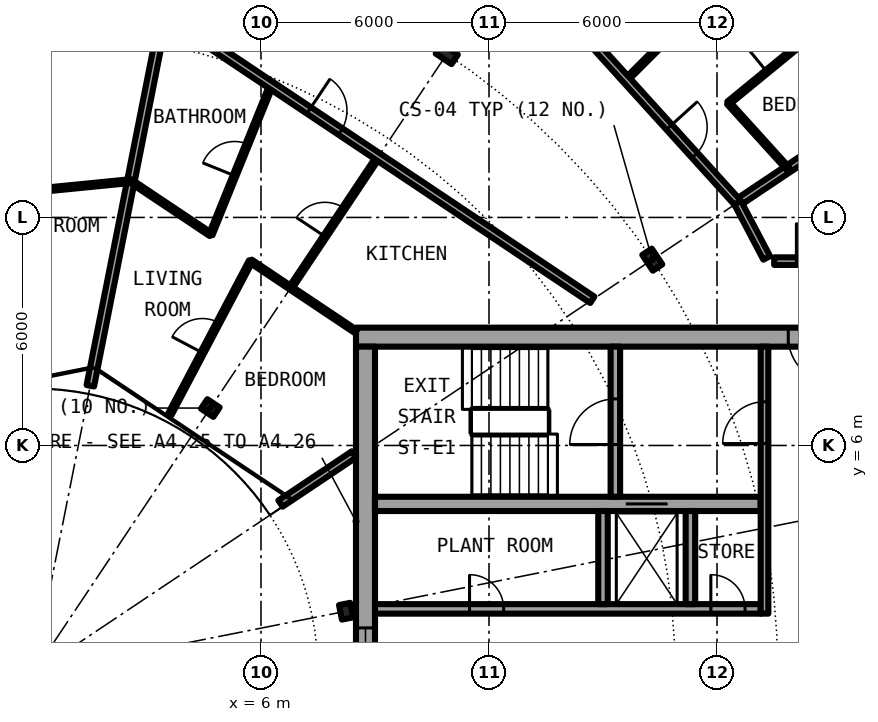
"""IFC4 building model, lengths in metres.
Left out: names, types, materials, properties, quantities, classifications, styles, units other than length and angle.
Written with IfcOpenShell. Run it as: python <this file> out.ifc"""

import sys

from ifc_helpers import new_model, si_unit, direction, frame, frame_2d, origin, origin_2d, place, context, subcontext, project, spatial, rectangle, i_section, extrude, element, fill, save


model = new_model("IFC4")
c1 = context("Model", 3, precision=1e-05, world=origin(), true_north=direction((0.0, 1.0)))
c2 = subcontext(c1, "Body", "Model", "MODEL_VIEW")
j1 = project(units=[si_unit("LENGTHUNIT", "METRE"), si_unit("PLANEANGLEUNIT", "RADIAN")], contexts=[c1])
p1 = place(None, origin())
s1 = spatial("IfcSite", under=j1, at=p1, CompositionType="ELEMENT")
p2 = place(p1, origin())
s2 = spatial("IfcBuilding", under=s1, at=p2, CompositionType="ELEMENT")
p3 = place(p2, frame((0.0, 0.0, 145.2)))
s3 = spatial("IfcBuildingStorey", under=s2, at=p3, CompositionType="ELEMENT", Elevation=145.2)
for number, where, z_axis, x_axis in (
    (1, (16.297, 10.889, 0.0), (0.0, 0.0, 1.0), (0.831, 0.556, 0.0)),
    (2, (10.889, 16.297, 0.0), (0.0, 0.0, 1.0), (0.556, 0.831, 0.0)),
):
    element("IfcColumn", number, at=place(p3, frame(where, z_axis=z_axis, x_axis=x_axis)), inside=s3, PredefinedType="COLUMN", context=c2, shape_type="SweptSolid", body=[
        extrude(i_section(OverallWidth=0.3, OverallDepth=0.5, WebThickness=0.014, FlangeThickness=0.028, FilletRadius=0.027, at=origin_2d()), origin(), (0.0, 0.0, 1.0), 3.05),
    ])
for number, where, z_axis, x_axis in (
    (3, (8.239, 1.639, 0.0), (0.0, 0.0, 1.0), (0.981, 0.195, 0.0)),
    (4, (4.667, 6.984, 0.0), (0.0, 0.0, 1.0), (0.556, 0.831, 0.0)),
):
    element("IfcColumn", number, at=place(p3, frame(where, z_axis=z_axis, x_axis=x_axis)), inside=s3, PredefinedType="COLUMN", context=c2, shape_type="SweptSolid", body=[
        extrude(i_section(OverallWidth=0.3, OverallDepth=0.39, WebThickness=0.011, FlangeThickness=0.019, FilletRadius=0.027, at=origin_2d()), origin(), (0.0, 0.0, 1.0), 3.05),
    ])
p4 = place(p3, frame((22.699, 15.167, 0.0), z_axis=(0.0, 0.0, 1.0), x_axis=(-0.634382322723, 0.773019449054, 0.0)))
e5 = element("IfcWall", 5, at=p4, inside=s3, PredefinedType="SOLIDWALL", context=c2, shape_type="SweptSolid", body=[
    extrude(rectangle(XDim=5.352, YDim=0.25, at=frame_2d((2.676, 0.0))), origin(), (0.0, 0.0, 1.0), 2.7),
])
p5 = place(p4, frame((0.441, 0.0, 0.3)))
e6 = element("IfcOpeningElement", 6, at=p5, cuts=e5, PredefinedType="OPENING", context=c2, shape_type="SweptSolid", body=[
    extrude(rectangle(XDim=1.8, YDim=2.1, at=frame_2d((0.9, 1.05))), frame((0.0, 0.135, 0.0), z_axis=(0.0, -1.0, 0.0), x_axis=(1.0, 0.0, 0.0)), (0.0, 0.0, 1.0), 0.27),
])
p6 = place(p4, frame((3.51, 0.0, 0.0)))
e7 = element("IfcOpeningElement", 7, at=p6, cuts=e5, PredefinedType="OPENING", context=c2, shape_type="SweptSolid", body=[
    extrude(rectangle(XDim=1.0, YDim=2.2, at=frame_2d((0.5, 1.1))), frame((0.0, 0.135, 0.0), z_axis=(0.0, -1.0, 0.0), x_axis=(1.0, 0.0, 0.0)), (0.0, 0.0, 1.0), 0.27),
])
p7 = place(p3, frame((22.1, 8.85, 0.0), z_axis=(0.0, 0.0, 1.0), x_axis=(-1.0, 0.0, 0.0)))
e8 = element("IfcWall", 8, at=p7, inside=s3, PredefinedType="SHEAR", context=c2, shape_type="SweptSolid", body=[
    extrude(rectangle(XDim=13.6, YDim=0.5, at=frame_2d((6.8, 0.0))), origin(), (0.0, 0.0, 1.0), 3.05),
])
p8 = place(p7, frame((1.025, 0.0, 0.0)))
e9 = element("IfcOpeningElement", 9, at=p8, cuts=e8, PredefinedType="OPENING", context=c2, shape_type="SweptSolid", body=[
    extrude(rectangle(XDim=1.2, YDim=2.3, at=frame_2d((0.6, 1.15))), frame((0.0, 0.26, 0.0), z_axis=(0.0, -1.0, 0.0), x_axis=(1.0, 0.0, 0.0)), (0.0, 0.0, 1.0), 0.52),
])
p9 = place(p3, frame((8.75, -8.6, 0.0), z_axis=(0.0, 0.0, 1.0), x_axis=(0.0, 1.0, 0.0)))
e10 = element("IfcWall", 10, at=p9, inside=s3, PredefinedType="SHEAR", context=c2, shape_type="SweptSolid", body=[
    extrude(rectangle(XDim=17.2, YDim=0.5, at=frame_2d((8.6, 0.0))), origin(), (0.0, 0.0, 1.0), 3.05),
])
p10 = place(p9, frame((7.4, 0.0, 0.1)))
e11 = element("IfcOpeningElement", 11, at=p10, cuts=e10, PredefinedType="OPENING", context=c2, shape_type="SweptSolid", body=[
    extrude(rectangle(XDim=2.4, YDim=2.2, at=frame_2d((1.2, 1.1))), frame((0.0, 0.26, 0.0), z_axis=(0.0, -1.0, 0.0), x_axis=(1.0, 0.0, 0.0)), (0.0, 0.0, 1.0), 0.52),
])
p11 = place(p3, frame((9.0, 1.7, 0.0), z_axis=(0.0, 0.0, 1.0), x_axis=(1.0, 0.0, 0.0)))
e12 = element("IfcWall", 12, at=p11, inside=s3, PredefinedType="SHEAR", context=c2, shape_type="SweptSolid", body=[
    extrude(rectangle(XDim=10.15, YDim=0.25, at=frame_2d((5.075, 0.0))), origin(), (0.0, 0.0, 1.0), 3.05),
])
p12 = place(p11, frame((2.488, 0.0, 0.0)))
e13 = element("IfcOpeningElement", 13, at=p12, cuts=e12, PredefinedType="OPENING", context=c2, shape_type="SweptSolid", body=[
    extrude(rectangle(XDim=0.9, YDim=2.3, at=frame_2d((0.45, 1.15))), frame((0.0, 0.135, 0.0), z_axis=(0.0, -1.0, 0.0), x_axis=(1.0, 0.0, 0.0)), (0.0, 0.0, 1.0), 0.27),
])
p13 = place(p11, frame((8.837, 0.0, 0.0)))
e14 = element("IfcOpeningElement", 14, at=p13, cuts=e12, PredefinedType="OPENING", context=c2, shape_type="SweptSolid", body=[
    extrude(rectangle(XDim=0.9, YDim=2.3, at=frame_2d((0.45, 1.15))), frame((0.0, 0.135, 0.0), z_axis=(0.0, -1.0, 0.0), x_axis=(1.0, 0.0, 0.0)), (0.0, 0.0, 1.0), 0.27),
])
p14 = place(p3, frame((9.0, 4.462, 0.0), z_axis=(0.0, 0.0, 1.0), x_axis=(1.0, 0.0, 0.0)))
e15 = element("IfcWall", 15, at=p14, inside=s3, PredefinedType="SHEAR", context=c2, shape_type="SweptSolid", body=[
    extrude(rectangle(XDim=10.15, YDim=0.375, at=frame_2d((5.075, 0.0))), origin(), (0.0, 0.0, 1.0), 3.05),
])
p15 = place(p14, frame((6.6, 0.0, 0.0)))
e16 = element("IfcOpeningElement", 16, at=p15, cuts=e15, PredefinedType="OPENING", context=c2, shape_type="SweptSolid", body=[
    extrude(rectangle(XDim=1.1, YDim=2.3, at=frame_2d((0.55, 1.15))), frame((0.0, 0.198, 0.0), z_axis=(0.0, -1.0, 0.0), x_axis=(1.0, 0.0, 0.0)), (0.0, 0.0, 1.0), 0.395),
])
p16 = place(p3, frame((15.325, 4.65, 0.0), z_axis=(0.0, 0.0, 1.0), x_axis=(0.0, 1.0, 0.0)))
e17 = element("IfcWall", 17, at=p16, inside=s3, PredefinedType="SHEAR", context=c2, shape_type="SweptSolid", body=[
    extrude(rectangle(XDim=3.95, YDim=0.25, at=frame_2d((1.975, 0.0))), origin(), (0.0, 0.0, 1.0), 3.05),
])
p17 = place(p16, frame((1.375, 0.0, 0.0)))
e18 = element("IfcOpeningElement", 18, at=p17, cuts=e17, PredefinedType="OPENING", context=c2, shape_type="SweptSolid", body=[
    extrude(rectangle(XDim=1.2, YDim=2.3, at=frame_2d((0.6, 1.15))), frame((0.0, 0.135, 0.0), z_axis=(0.0, -1.0, 0.0), x_axis=(1.0, 0.0, 0.0)), (0.0, 0.0, 1.0), 0.27),
])
for number, where, z_axis, x_axis in (
    (19, (15.0, 1.825, 0.0), (0.0, 0.0, 1.0), (0.0, 1.0, 0.0)),
    (20, (17.3, 1.825, 0.0), (0.0, 0.0, 1.0), (0.0, 1.0, 0.0)),
):
    element("IfcWall", number, at=place(p3, frame(where, z_axis=z_axis, x_axis=x_axis)), inside=s3, PredefinedType="SOLIDWALL", context=c2, shape_type="SweptSolid", body=[
        extrude(rectangle(XDim=2.45, YDim=0.25, at=frame_2d((1.225, 0.0))), origin(), (0.0, 0.0, 1.0), 2.7),
    ])
p18 = place(p3, frame((19.25, 1.575, 0.0), z_axis=(0.0, 0.0, 1.0), x_axis=(0.0, 1.0, 0.0)))
e21 = element("IfcWall", 21, at=p18, inside=s3, PredefinedType="SOLIDWALL", context=c2, shape_type="SweptSolid", body=[
    extrude(rectangle(XDim=7.025, YDim=0.2, at=frame_2d((3.513, 0.0))), origin(), (0.0, 0.0, 1.0), 2.7),
])
p19 = place(p18, frame((4.475, 0.0, 0.0)))
e22 = element("IfcOpeningElement", 22, at=p19, cuts=e21, PredefinedType="OPENING", context=c2, shape_type="SweptSolid", body=[
    extrude(rectangle(XDim=1.1, YDim=2.3, at=frame_2d((0.55, 1.15))), frame((0.0, 0.11, 0.0), z_axis=(0.0, -1.0, 0.0), x_axis=(1.0, 0.0, 0.0)), (0.0, 0.0, 1.0), 0.22),
])
p20 = place(p3, frame((1.509, 7.571, 0.0), z_axis=(0.0, 0.0, 1.0), x_axis=(0.194375258943, 0.980927244351, 0.0)))
e23 = element("IfcWall", 23, at=p20, inside=s3, PredefinedType="PARTITIONING", context=c2, shape_type="SweptSolid", body=[
    extrude(rectangle(XDim=9.98, YDim=0.2, at=frame_2d((4.99, 0.0))), origin(), (0.0, 0.0, 1.0), 2.7),
])
p21 = place(p3, frame((3.605, 6.827, 0.0), z_axis=(0.0, 0.0, 1.0), x_axis=(0.466962677975, 0.884277025246, 0.0)))
e24 = element("IfcWall", 24, at=p21, inside=s3, PredefinedType="PARTITIONING", context=c2, shape_type="SweptSolid", body=[
    extrude(rectangle(XDim=4.549, YDim=0.1, at=frame_2d((2.274, 0.0))), origin(), (0.0, 0.0, 1.0), 2.7),
])
p22 = place(p21, frame((1.824, 0.0, 0.0)))
e25 = element("IfcOpeningElement", 25, at=p22, cuts=e24, PredefinedType="OPENING", context=c2, shape_type="SweptSolid", body=[
    extrude(rectangle(XDim=0.9, YDim=2.3, at=frame_2d((0.45, 1.15))), frame((0.0, 0.06, 0.0), z_axis=(0.0, -1.0, 0.0), x_axis=(1.0, 0.0, 0.0)), (0.0, 0.0, 1.0), 0.12),
])
p23 = place(p3, frame((4.678, 11.551, 0.0), z_axis=(0.0, 0.0, 1.0), x_axis=(0.375509828455, 0.926818411952, 0.0)))
e26 = element("IfcWall", 26, at=p23, inside=s3, PredefinedType="PARTITIONING", context=c2, shape_type="SweptSolid", body=[
    extrude(rectangle(XDim=4.237, YDim=0.1, at=frame_2d((2.119, 0.0))), origin(), (0.0, 0.0, 1.0), 2.7),
])
p24 = place(p23, frame((1.669, 0.0, 0.0)))
e27 = element("IfcOpeningElement", 27, at=p24, cuts=e26, PredefinedType="OPENING", context=c2, shape_type="SweptSolid", body=[
    extrude(rectangle(XDim=0.9, YDim=2.3, at=frame_2d((0.45, 1.15))), frame((0.0, 0.06, 0.0), z_axis=(0.0, -1.0, 0.0), x_axis=(1.0, 0.0, 0.0)), (0.0, 0.0, 1.0), 0.12),
])
p25 = place(p3, frame((6.78, 10.147, 0.0), z_axis=(0.0, 0.0, 1.0), x_axis=(0.555528237031, 0.831497671591, 0.0)))
e28 = element("IfcWall", 28, at=p25, inside=s3, PredefinedType="PARTITIONING", context=c2, shape_type="SweptSolid", body=[
    extrude(rectangle(XDim=4.149, YDim=0.1, at=frame_2d((2.075, 0.0))), origin(), (0.0, 0.0, 1.0), 2.7),
])
p26 = place(p25, frame((1.625, 0.0, 0.0)))
e29 = element("IfcOpeningElement", 29, at=p26, cuts=e28, PredefinedType="OPENING", context=c2, shape_type="SweptSolid", body=[
    extrude(rectangle(XDim=0.9, YDim=2.3, at=frame_2d((0.45, 1.15))), frame((0.0, 0.06, 0.0), z_axis=(0.0, -1.0, 0.0), x_axis=(1.0, 0.0, 0.0)), (0.0, 0.0, 1.0), 0.12),
])
p27 = place(p3, frame((15.612, 15.622, 0.0), z_axis=(0.0, 0.0, 1.0), x_axis=(0.70679853939, 0.707414888673, 0.0)))
e30 = element("IfcWall", 30, at=p27, inside=s3, PredefinedType="PARTITIONING", context=c2, shape_type="SweptSolid", body=[
    extrude(rectangle(XDim=1.584, YDim=0.1, at=frame_2d((0.792, 0.0))), origin(), (0.0, 0.0, 1.0), 2.7),
])
p28 = place(p3, frame((18.302, 15.01, 0.0), z_axis=(0.0, 0.0, 1.0), x_axis=(0.773165322764, 0.634204528267, 0.0)))
e31 = element("IfcWall", 31, at=p28, inside=s3, PredefinedType="PARTITIONING", context=c2, shape_type="SweptSolid", body=[
    extrude(rectangle(XDim=3.505, YDim=0.1, at=frame_2d((1.752, 0.0))), origin(), (0.0, 0.0, 1.0), 2.7),
])
p29 = place(p28, frame((1.303, 0.0, 0.0)))
e32 = element("IfcOpeningElement", 32, at=p29, cuts=e31, PredefinedType="OPENING", context=c2, shape_type="SweptSolid", body=[
    extrude(rectangle(XDim=0.9, YDim=2.3, at=frame_2d((0.45, 1.15))), frame((0.0, 0.06, 0.0), z_axis=(0.0, -1.0, 0.0), x_axis=(1.0, 0.0, 0.0)), (0.0, 0.0, 1.0), 0.12),
])
p30 = place(p3, frame((18.542, 12.389, 0.0), z_axis=(0.0, 0.0, 1.0), x_axis=(0.831387096605, 0.55569370664, 0.0)))
e33 = element("IfcWall", 33, at=p30, inside=s3, PredefinedType="PARTITIONING", context=c2, shape_type="SweptSolid", body=[
    extrude(rectangle(XDim=4.875, YDim=0.2, at=frame_2d((2.438, 0.0))), origin(), (0.0, 0.0, 1.0), 2.7),
])
p31 = place(p3, frame((6.513, 4.472, 0.0), z_axis=(0.0, 0.0, 1.0), x_axis=(0.83133816625, 0.555766905579, 0.0)))
e34 = element("IfcWall", 34, at=p31, inside=s3, PredefinedType="PARTITIONING", context=c2, shape_type="SweptSolid", body=[
    extrude(rectangle(XDim=2.323, YDim=0.2, at=frame_2d((1.162, 0.0))), origin(), (0.0, 0.0, 1.0), 2.7),
])
p32 = place(p3, frame((19.504, 10.85, 0.0), z_axis=(0.0, 0.0, 1.0), x_axis=(1.0, 0.0, 0.0)))
e35 = element("IfcWall", 35, at=p32, inside=s3, PredefinedType="PARTITIONING", context=c2, shape_type="SweptSolid", body=[
    extrude(rectangle(XDim=2.171, YDim=0.2, at=frame_2d((1.085, 0.0))), origin(), (0.0, 0.0, 1.0), 2.7),
])
p33 = place(p32, frame((0.585, 0.0, 0.0)))
e36 = element("IfcOpeningElement", 36, at=p33, cuts=e35, PredefinedType="OPENING", context=c2, shape_type="SweptSolid", body=[
    extrude(rectangle(XDim=1.0, YDim=2.3, at=frame_2d((0.5, 1.15))), frame((0.0, 0.11, 0.0), z_axis=(0.0, -1.0, 0.0), x_axis=(1.0, 0.0, 0.0)), (0.0, 0.0, 1.0), 0.22),
])
p34 = place(p3, frame((2.577, 12.955, 0.0), z_axis=(0.0, 0.0, 1.0), x_axis=(0.831440395268, -0.555613956912, 0.0)))
e37 = element("IfcWall", 37, at=p34, inside=s3, PredefinedType="PARTITIONING", context=c2, shape_type="SweptSolid", body=[
    extrude(rectangle(XDim=2.527, YDim=0.1, at=frame_2d((1.264, 0.0))), origin(), (0.0, 0.0, 1.0), 2.7),
])
p35 = place(p3, frame((5.731, 10.848, 0.0), z_axis=(0.0, 0.0, 1.0), x_axis=(0.831339441646, -0.555764997786, 0.0)))
e38 = element("IfcWall", 38, at=p35, inside=s3, PredefinedType="PARTITIONING", context=c2, shape_type="SweptSolid", body=[
    extrude(rectangle(XDim=3.332, YDim=0.1, at=frame_2d((1.666, 0.0))), origin(), (0.0, 0.0, 1.0), 2.7),
])
p36 = place(p3, frame((-1.246, 12.578, 0.0), z_axis=(0.0, 0.0, 1.0), x_axis=(0.995125670186, 0.098614910314, 0.0)))
e39 = element("IfcWall", 39, at=p36, inside=s3, PredefinedType="PARTITIONING", context=c2, shape_type="SweptSolid", body=[
    extrude(rectangle(XDim=3.835, YDim=0.1, at=frame_2d((1.917, 0.0))), origin(), (0.0, 0.0, 1.0), 2.7),
])
p37 = place(p3, frame((3.453, 17.36, 0.0), z_axis=(0.0, 0.0, 1.0), x_axis=(0.831437137577, -0.555618831806, 0.0)))
e40 = element("IfcWall", 40, at=p37, inside=s3, PredefinedType="PARTITIONING", context=c2, shape_type="SweptSolid", body=[
    extrude(rectangle(XDim=13.549, YDim=0.2, at=frame_2d((6.774, 0.0))), origin(), (0.0, 0.0, 1.0), 2.7),
])
p38 = place(p37, frame((4.581, 0.0, 0.0)))
e41 = element("IfcOpeningElement", 41, at=p38, cuts=e40, PredefinedType="OPENING", context=c2, shape_type="SweptSolid", body=[
    extrude(rectangle(XDim=1.0, YDim=2.3, at=frame_2d((0.5, 1.15))), frame((0.0, 0.11, 0.0), z_axis=(0.0, -1.0, 0.0), x_axis=(1.0, 0.0, 0.0)), (0.0, 0.0, 1.0), 0.22),
])
p39 = place(p3, frame((-6.773, 16.353, 0.0), z_axis=(0.0, 0.0, 1.0), x_axis=(0.995201809366, 0.097843541607, 0.0)))
e42 = element("IfcWall", 42, at=p39, inside=s3, PredefinedType="PARTITIONING", context=c2, shape_type="SweptSolid", body=[
    extrude(rectangle(XDim=10.28, YDim=0.2, at=frame_2d((5.14, 0.0))), origin(), (0.0, 0.0, 1.0), 2.7),
])
p40 = place(p39, frame((4.638, 0.0, 0.0)))
e43 = element("IfcOpeningElement", 43, at=p40, cuts=e42, PredefinedType="OPENING", context=c2, shape_type="SweptSolid", body=[
    extrude(rectangle(XDim=1.0, YDim=2.3, at=frame_2d((0.5, 1.15))), frame((0.0, 0.11, 0.0), z_axis=(0.0, -1.0, 0.0), x_axis=(1.0, 0.0, 0.0)), (0.0, 0.0, 1.0), 0.22),
])
p41 = place(p3, frame((14.147, 17.238, 0.0), z_axis=(0.0, 0.0, 1.0), x_axis=(0.671561669125, -0.740948665268, 0.0)))
e44 = element("IfcWall", 44, at=p41, inside=s3, PredefinedType="PARTITIONING", context=c2, shape_type="SweptSolid", body=[
    extrude(rectangle(XDim=6.544, YDim=0.2, at=frame_2d((3.272, 0.0))), origin(), (0.0, 0.0, 1.0), 2.7),
])
p42 = place(p41, frame((3.862, 0.0, 0.0)))
e45 = element("IfcOpeningElement", 45, at=p42, cuts=e44, PredefinedType="OPENING", context=c2, shape_type="SweptSolid", body=[
    extrude(rectangle(XDim=1.0, YDim=2.3, at=frame_2d((0.5, 1.15))), frame((0.0, 0.11, 0.0), z_axis=(0.0, -1.0, 0.0), x_axis=(1.0, 0.0, 0.0)), (0.0, 0.0, 1.0), 0.22),
])
p43 = place(p3, frame((18.542, 12.389, 0.0), z_axis=(0.0, 0.0, 1.0), x_axis=(0.465605550524, -0.884992356646, 0.0)))
e46 = element("IfcWall", 46, at=p43, inside=s3, PredefinedType="PARTITIONING", context=c2, shape_type="SweptSolid", body=[
    extrude(rectangle(XDim=1.643, YDim=0.2, at=frame_2d((0.821, 0.0))), origin(), (0.0, 0.0, 1.0), 2.7),
])
p44 = place(p3, frame((18.302, 15.01, 0.0), z_axis=(0.0, 0.0, 1.0), x_axis=(0.671637685376, -0.740879760544, 0.0)))
e47 = element("IfcWall", 47, at=p44, inside=s3, PredefinedType="PARTITIONING", context=c2, shape_type="SweptSolid", body=[
    extrude(rectangle(XDim=2.338, YDim=0.1, at=frame_2d((1.169, 0.0))), origin(), (0.0, 0.0, 1.0), 2.7),
])
p45 = place(p15, origin())
e48 = element("IfcDoor", 48, at=p45, inside=s3, OperationType="DOUBLE_DOOR_SLIDING", PredefinedType="DOOR", context=c2, shape_type="SweptSolid", body=[
    extrude(rectangle(XDim=1.1, YDim=2.3, at=frame_2d((0.55, 1.15))), frame((0.0, 0.025, 0.0), z_axis=(0.0, -1.0, 0.0), x_axis=(1.0, 0.0, 0.0)), (0.0, 0.0, 1.0), 0.05),
])
fill(e16, e48)
p46 = place(p12, origin())
e49 = element("IfcDoor", 49, at=p46, inside=s3, OperationType="SINGLE_SWING_RIGHT", PredefinedType="DOOR", context=c2, shape_type="SweptSolid", body=[
    extrude(rectangle(XDim=0.9, YDim=2.3, at=frame_2d((0.45, 1.15))), frame((0.0, 0.025, 0.0), z_axis=(0.0, -1.0, 0.0), x_axis=(1.0, 0.0, 0.0)), (0.0, 0.0, 1.0), 0.05),
])
fill(e13, e49)
p47 = place(p13, origin())
e50 = element("IfcDoor", 50, at=p47, inside=s3, OperationType="SINGLE_SWING_LEFT", PredefinedType="DOOR", context=c2, shape_type="SweptSolid", body=[
    extrude(rectangle(XDim=0.9, YDim=2.3, at=frame_2d((0.45, 1.15))), frame((0.0, 0.025, 0.0), z_axis=(0.0, -1.0, 0.0), x_axis=(1.0, 0.0, 0.0)), (0.0, 0.0, 1.0), 0.05),
])
fill(e14, e50)
p48 = place(p17, origin())
e51 = element("IfcDoor", 51, at=p48, inside=s3, OperationType="SINGLE_SWING_LEFT", PredefinedType="DOOR", context=c2, shape_type="SweptSolid", body=[
    extrude(rectangle(XDim=1.2, YDim=2.3, at=frame_2d((0.6, 1.15))), frame((0.0, 0.025, 0.0), z_axis=(0.0, -1.0, 0.0), x_axis=(1.0, 0.0, 0.0)), (0.0, 0.0, 1.0), 0.05),
])
fill(e18, e51)
p49 = place(p19, origin())
e52 = element("IfcDoor", 52, at=p49, inside=s3, OperationType="SINGLE_SWING_LEFT", PredefinedType="DOOR", context=c2, shape_type="SweptSolid", body=[
    extrude(rectangle(XDim=1.1, YDim=2.3, at=frame_2d((0.55, 1.15))), frame((0.0, 0.025, 0.0), z_axis=(0.0, -1.0, 0.0), x_axis=(1.0, 0.0, 0.0)), (0.0, 0.0, 1.0), 0.05),
])
fill(e22, e52)
p50 = place(p8, origin())
e53 = element("IfcDoor", 53, at=p50, inside=s3, OperationType="SINGLE_SWING_RIGHT", PredefinedType="DOOR", context=c2, shape_type="SweptSolid", body=[
    extrude(rectangle(XDim=1.2, YDim=2.3, at=frame_2d((0.6, 1.15))), frame((0.0, 0.025, 0.0), z_axis=(0.0, -1.0, 0.0), x_axis=(1.0, 0.0, 0.0)), (0.0, 0.0, 1.0), 0.05),
])
fill(e9, e53)
p51 = place(p10, origin())
e54 = element("IfcWindow", 54, at=p51, inside=s3, PartitioningType="SINGLE_PANEL", PredefinedType="WINDOW", context=c2, shape_type="SweptSolid", body=[
    extrude(rectangle(XDim=2.4, YDim=2.2, at=frame_2d((1.2, 1.1))), frame((0.0, 0.03, 0.0), z_axis=(0.0, -1.0, 0.0), x_axis=(1.0, 0.0, 0.0)), (0.0, 0.0, 1.0), 0.06),
])
fill(e11, e54)
p52 = place(p42, origin())
e55 = element("IfcDoor", 55, at=p52, inside=s3, OperationType="SINGLE_SWING_RIGHT", PredefinedType="DOOR", context=c2, shape_type="SweptSolid", body=[
    extrude(rectangle(XDim=1.0, YDim=2.3, at=frame_2d((0.5, 1.15))), frame((0.0, 0.025, 0.0), z_axis=(0.0, -1.0, 0.0), x_axis=(1.0, 0.0, 0.0)), (0.0, 0.0, 1.0), 0.05),
])
fill(e45, e55)
p53 = place(p29, origin())
e56 = element("IfcDoor", 56, at=p53, inside=s3, OperationType="SINGLE_SWING_RIGHT", PredefinedType="DOOR", context=c2, shape_type="SweptSolid", body=[
    extrude(rectangle(XDim=0.9, YDim=2.3, at=frame_2d((0.45, 1.15))), frame((0.0, 0.025, 0.0), z_axis=(0.0, -1.0, 0.0), x_axis=(1.0, 0.0, 0.0)), (0.0, 0.0, 1.0), 0.05),
])
fill(e32, e56)
p54 = place(p38, origin())
e57 = element("IfcDoor", 57, at=p54, inside=s3, OperationType="SINGLE_SWING_LEFT", PredefinedType="DOOR", context=c2, shape_type="SweptSolid", body=[
    extrude(rectangle(XDim=1.0, YDim=2.3, at=frame_2d((0.5, 1.15))), frame((0.0, 0.025, 0.0), z_axis=(0.0, -1.0, 0.0), x_axis=(1.0, 0.0, 0.0)), (0.0, 0.0, 1.0), 0.05),
])
fill(e41, e57)
p55 = place(p24, origin())
e58 = element("IfcDoor", 58, at=p55, inside=s3, OperationType="SINGLE_SWING_RIGHT", PredefinedType="DOOR", context=c2, shape_type="SweptSolid", body=[
    extrude(rectangle(XDim=0.9, YDim=2.3, at=frame_2d((0.45, 1.15))), frame((0.0, 0.025, 0.0), z_axis=(0.0, -1.0, 0.0), x_axis=(1.0, 0.0, 0.0)), (0.0, 0.0, 1.0), 0.05),
])
fill(e27, e58)
p56 = place(p26, origin())
e59 = element("IfcDoor", 59, at=p56, inside=s3, OperationType="SINGLE_SWING_RIGHT", PredefinedType="DOOR", context=c2, shape_type="SweptSolid", body=[
    extrude(rectangle(XDim=0.9, YDim=2.3, at=frame_2d((0.45, 1.15))), frame((0.0, 0.025, 0.0), z_axis=(0.0, -1.0, 0.0), x_axis=(1.0, 0.0, 0.0)), (0.0, 0.0, 1.0), 0.05),
])
fill(e29, e59)
p57 = place(p22, origin())
e60 = element("IfcDoor", 60, at=p57, inside=s3, OperationType="SINGLE_SWING_LEFT", PredefinedType="DOOR", context=c2, shape_type="SweptSolid", body=[
    extrude(rectangle(XDim=0.9, YDim=2.3, at=frame_2d((0.45, 1.15))), frame((0.0, 0.025, 0.0), z_axis=(0.0, -1.0, 0.0), x_axis=(1.0, 0.0, 0.0)), (0.0, 0.0, 1.0), 0.05),
])
fill(e25, e60)
p58 = place(p33, origin())
e61 = element("IfcDoor", 61, at=p58, inside=s3, OperationType="SINGLE_SWING_LEFT", PredefinedType="DOOR", context=c2, shape_type="SweptSolid", body=[
    extrude(rectangle(XDim=1.0, YDim=2.3, at=frame_2d((0.5, 1.15))), frame((0.0, 0.025, 0.0), z_axis=(0.0, -1.0, 0.0), x_axis=(1.0, 0.0, 0.0)), (0.0, 0.0, 1.0), 0.05),
])
fill(e36, e61)
save(model, sys.argv[1])
